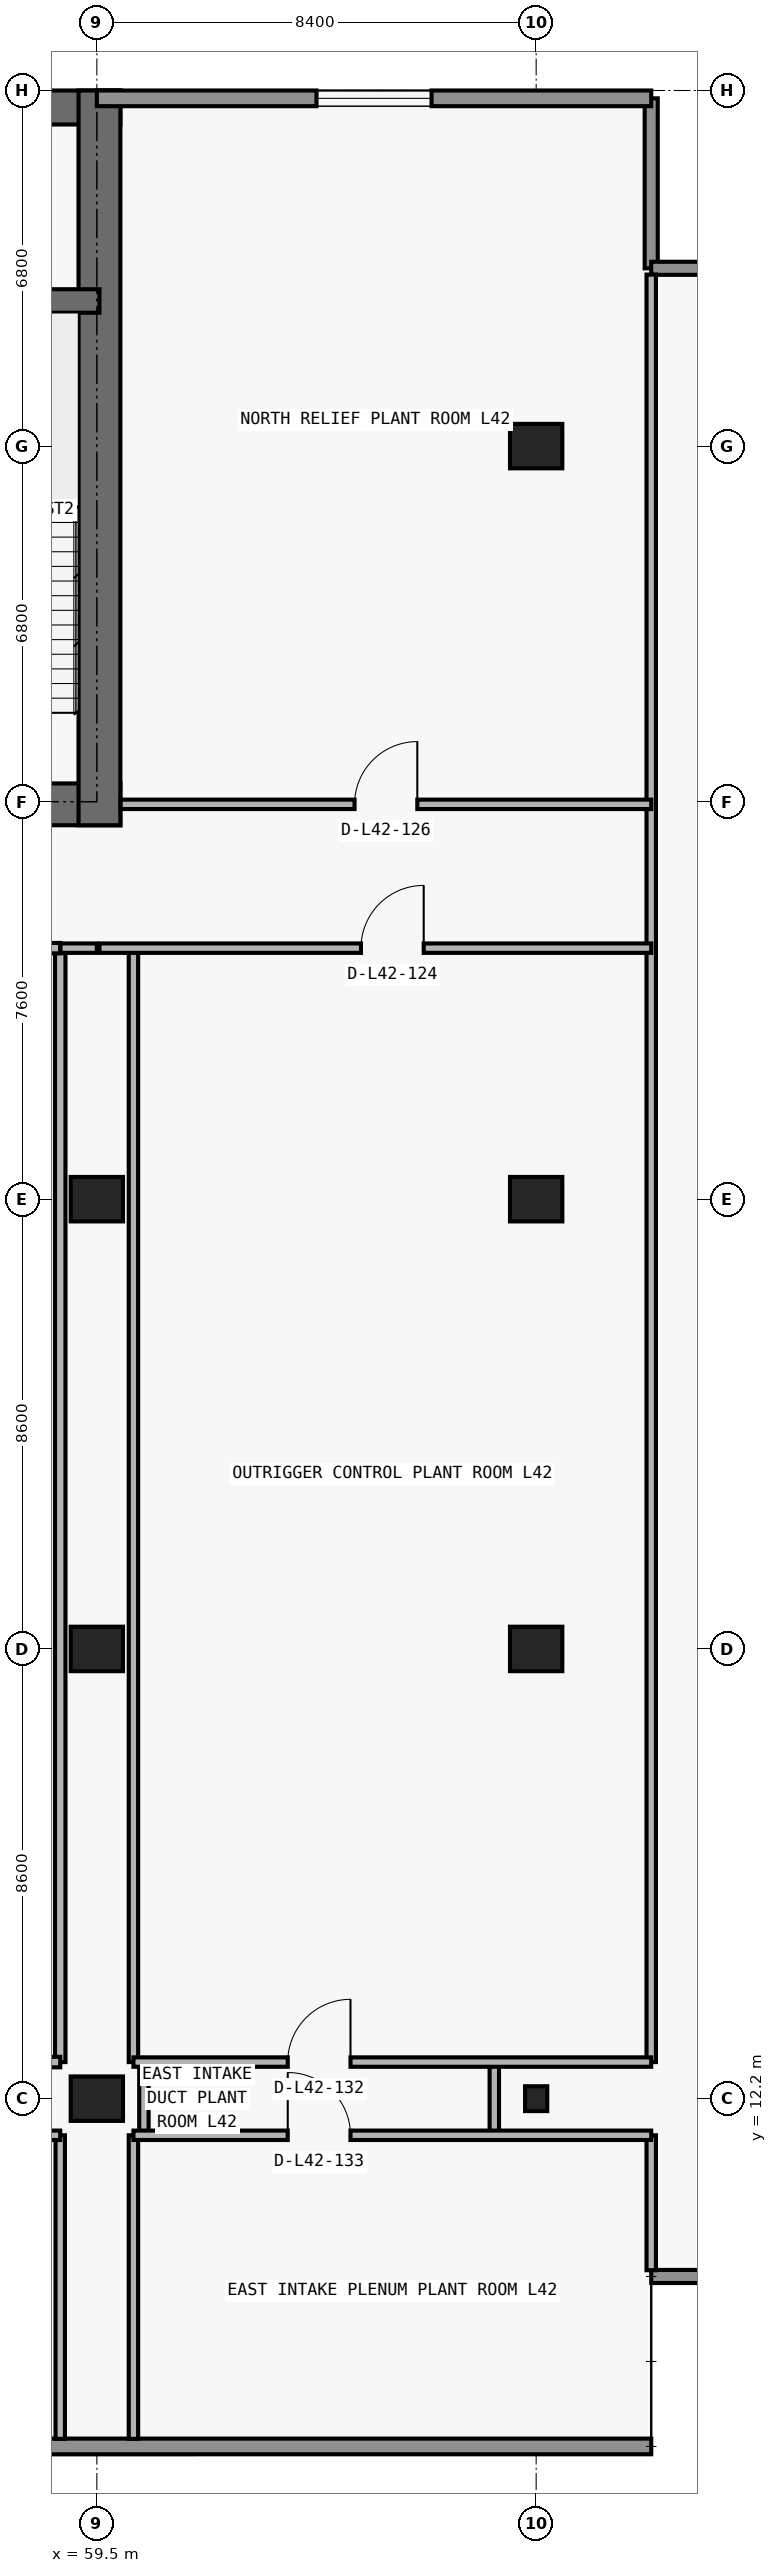
"""IFC4 building model, lengths in metres.
Left out: names, types, materials, properties, quantities, classifications, styles, units other than length and angle.
Written with IfcOpenShell. Run it as: python <this file> out.ifc"""

import sys

from ifc_helpers import new_model, si_unit, direction, frame, frame_2d, origin, origin_2d, place, context, subcontext, project, spatial, rectangle, i_section, extrude, element, fill, save


model = new_model("IFC4")
c1 = context("Model", 3, precision=1e-05, world=origin(), true_north=direction((0.0, 1.0)))
c2 = subcontext(c1, "Body", "Model", "MODEL_VIEW")
j1 = project(units=[si_unit("LENGTHUNIT", "METRE"), si_unit("PLANEANGLEUNIT", "RADIAN")], contexts=[c1])
p1 = place(None, origin())
s1 = spatial("IfcSite", under=j1, at=p1, CompositionType="ELEMENT")
p2 = place(p1, origin())
s2 = spatial("IfcBuilding", under=s1, at=p2, CompositionType="ELEMENT")
p3 = place(p2, frame((0.0, 0.0, 152.1)))
s3 = spatial("IfcBuildingStorey", under=s2, at=p3, CompositionType="ELEMENT", Elevation=152.1)
p4 = place(p3, frame((59.5, 12.2, 0.0), z_axis=(0.0, 0.0, 1.0), x_axis=(1.0, 0.0, 0.0)))
e1 = element("IfcColumn", 1, at=p4, inside=s3, PredefinedType="COLUMN", context=c2, shape_type="SweptSolid", body=[
    extrude(rectangle(XDim=1.0, YDim=0.85, at=origin_2d()), origin(), (0.0, 0.0, 1.0), 4.85),
])
p5 = place(p3, frame((67.9, 12.2, 0.0), z_axis=(0.0, 0.0, 1.0), x_axis=(1.0, 0.0, 0.0)))
e2 = element("IfcColumn", 2, at=p5, inside=s3, PredefinedType="COLUMN", context=c2, shape_type="SweptSolid", body=[
    extrude(i_section(OverallWidth=0.424, OverallDepth=0.475, WebThickness=0.048, FlangeThickness=0.077, FilletRadius=0.015, at=origin_2d()), origin(), (0.0, 0.0, 1.0), 4.85),
])
for number, where, z_axis, x_axis in (
    (3, (59.5, 20.8, 0.0), (0.0, 0.0, 1.0), (1.0, 0.0, 0.0)),
    (4, (67.9, 20.8, 0.0), (0.0, 0.0, 1.0), (1.0, 0.0, 0.0)),
    (5, (59.5, 29.4, 0.0), (0.0, 0.0, 1.0), (1.0, 0.0, 0.0)),
    (6, (67.9, 29.4, 0.0), (0.0, 0.0, 1.0), (1.0, 0.0, 0.0)),
    (7, (67.9, 43.8, 0.0), (0.0, 0.0, 1.0), (1.0, 0.0, 0.0)),
):
    element("IfcColumn", number, at=place(p3, frame(where, z_axis=z_axis, x_axis=x_axis)), inside=s3, PredefinedType="COLUMN", context=c2, shape_type="SweptSolid", body=[
        extrude(rectangle(XDim=1.0, YDim=0.85, at=origin_2d()), origin(), (0.0, 0.0, 1.0), 4.85),
    ])
p6 = place(p3, frame((17.85, 36.95, 0.0), z_axis=(0.0, 0.0, 1.0), x_axis=(1.0, 0.0, 0.0)))
e8 = element("IfcWall", 8, at=p6, inside=s3, PredefinedType="SHEAR", context=c2, shape_type="SweptSolid", body=[
    extrude(rectangle(XDim=42.1, YDim=0.8, at=frame_2d((21.05, 0.0))), origin(), (0.0, 0.0, 1.0), 4.85),
])
p7 = place(p6, frame((14.45, 0.0, 0.0)))
e9 = element("IfcOpeningElement", 9, at=p7, cuts=e8, PredefinedType="OPENING", context=c2, shape_type="SweptSolid", body=[
    extrude(rectangle(XDim=1.1, YDim=2.15, at=frame_2d((0.55, 1.075))), frame((0.0, 0.41, 0.0), z_axis=(0.0, -1.0, 0.0), x_axis=(1.0, 0.0, 0.0)), (0.0, 0.0, 1.0), 0.82),
])
p8 = place(p6, frame((6.3, 0.0, 0.0)))
e10 = element("IfcOpeningElement", 10, at=p8, cuts=e8, PredefinedType="OPENING", context=c2, shape_type="SweptSolid", body=[
    extrude(rectangle(XDim=1.05, YDim=2.15, at=frame_2d((0.525, 1.075))), frame((0.0, 0.41, 0.0), z_axis=(0.0, -1.0, 0.0), x_axis=(1.0, 0.0, 0.0)), (0.0, 0.0, 1.0), 0.82),
])
p9 = place(p6, frame((34.8, 0.0, 0.0)))
e11 = element("IfcOpeningElement", 11, at=p9, cuts=e8, PredefinedType="OPENING", context=c2, shape_type="SweptSolid", body=[
    extrude(rectangle(XDim=1.05, YDim=2.15, at=frame_2d((0.525, 1.075))), frame((0.0, 0.41, 0.0), z_axis=(0.0, -1.0, 0.0), x_axis=(1.0, 0.0, 0.0)), (0.0, 0.0, 1.0), 0.82),
])
p10 = place(p6, frame((10.913, 0.0, 0.0)))
e12 = element("IfcOpeningElement", 12, at=p10, cuts=e8, PredefinedType="OPENING", context=c2, shape_type="SweptSolid", body=[
    extrude(rectangle(XDim=1.05, YDim=2.15, at=frame_2d((0.525, 1.075))), frame((0.0, 0.41, 0.0), z_axis=(0.0, -1.0, 0.0), x_axis=(1.0, 0.0, 0.0)), (0.0, 0.0, 1.0), 0.82),
])
p11 = place(p6, frame((24.15, 0.0, 0.0)))
e13 = element("IfcOpeningElement", 13, at=p11, cuts=e8, PredefinedType="OPENING", context=c2, shape_type="SweptSolid", body=[
    extrude(rectangle(XDim=1.05, YDim=2.15, at=frame_2d((0.525, 1.075))), frame((0.0, 0.41, 0.0), z_axis=(0.0, -1.0, 0.0), x_axis=(1.0, 0.0, 0.0)), (0.0, 0.0, 1.0), 0.82),
])
p12 = place(p3, frame((17.85, 50.275, 0.0), z_axis=(0.0, 0.0, 1.0), x_axis=(1.0, 0.0, 0.0)))
e14 = element("IfcWall", 14, at=p12, inside=s3, PredefinedType="SHEAR", context=c2, shape_type="SweptSolid", body=[
    extrude(rectangle(XDim=42.1, YDim=0.65, at=frame_2d((21.05, 0.0))), origin(), (0.0, 0.0, 1.0), 4.85),
])
p13 = place(p3, frame((59.55, 36.55, 0.0), z_axis=(0.0, 0.0, 1.0), x_axis=(0.0, 1.0, 0.0)))
e15 = element("IfcWall", 15, at=p13, inside=s3, PredefinedType="SHEAR", context=c2, shape_type="SweptSolid", body=[
    extrude(rectangle(XDim=14.05, YDim=0.8, at=frame_2d((7.025, 0.0))), origin(), (0.0, 0.0, 1.0), 4.85),
])
p14 = place(p3, frame((18.25, 46.575, 0.0), z_axis=(0.0, 0.0, 1.0), x_axis=(1.0, 0.0, 0.0)))
e16 = element("IfcWall", 16, at=p14, inside=s3, PredefinedType="SHEAR", context=c2, shape_type="SweptSolid", body=[
    extrude(rectangle(XDim=41.3, YDim=0.45, at=frame_2d((20.65, 0.0))), origin(), (0.0, 0.0, 1.0), 4.85),
])
p15 = place(p14, frame((7.625, 0.0, 0.0)))
e17 = element("IfcOpeningElement", 17, at=p15, cuts=e16, PredefinedType="OPENING", context=c2, shape_type="SweptSolid", body=[
    extrude(rectangle(XDim=1.05, YDim=2.15, at=frame_2d((0.525, 1.075))), frame((0.0, 0.235, 0.0), z_axis=(0.0, -1.0, 0.0), x_axis=(1.0, 0.0, 0.0)), (0.0, 0.0, 1.0), 0.47),
])
p16 = place(p14, frame((32.675, 0.0, 0.0)))
e18 = element("IfcOpeningElement", 18, at=p16, cuts=e16, PredefinedType="OPENING", context=c2, shape_type="SweptSolid", body=[
    extrude(rectangle(XDim=1.05, YDim=2.15, at=frame_2d((0.525, 1.075))), frame((0.0, 0.235, 0.0), z_axis=(0.0, -1.0, 0.0), x_axis=(1.0, 0.0, 0.0)), (0.0, 0.0, 1.0), 0.47),
])
p17 = place(p3, frame((70.1, 5.55, 0.0), z_axis=(0.0, 0.0, 1.0), x_axis=(-1.0, 0.0, 0.0)))
e19 = element("IfcWall", 19, at=p17, inside=s3, PredefinedType="STANDARD", context=c2, shape_type="SweptSolid", body=[
    extrude(rectangle(XDim=62.4, YDim=0.3, at=frame_2d((31.2, 0.0))), origin(), (0.0, 0.0, 1.0), 4.85),
])
p18 = place(p3, frame((70.1, 8.8, 0.0), z_axis=(0.0, 0.0, 1.0), x_axis=(1.0, 0.0, 0.0)))
e20 = element("IfcWall", 20, at=p18, inside=s3, PredefinedType="ELEMENTEDWALL", context=c2, shape_type="SweptSolid", body=[
    extrude(rectangle(XDim=3.65, YDim=0.25, at=frame_2d((1.825, 0.0))), origin(), (0.0, 0.0, 1.0), 4.85),
])
p19 = place(p3, frame((70.1, 50.45, 0.0), z_axis=(0.0, 0.0, 1.0), x_axis=(0.0, -1.0, 0.0)))
e21 = element("IfcWall", 21, at=p19, inside=s3, PredefinedType="ELEMENTEDWALL", context=c2, shape_type="SweptSolid", body=[
    extrude(rectangle(XDim=3.25, YDim=0.25, at=frame_2d((1.625, 0.0))), origin(), (0.0, 0.0, 1.0), 4.85),
])
p20 = place(p3, frame((70.1, 47.2, 0.0), z_axis=(0.0, 0.0, 1.0), x_axis=(1.0, 0.0, 0.0)))
e22 = element("IfcWall", 22, at=p20, inside=s3, PredefinedType="ELEMENTEDWALL", context=c2, shape_type="SweptSolid", body=[
    extrude(rectangle(XDim=3.65, YDim=0.25, at=frame_2d((1.825, 0.0))), origin(), (0.0, 0.0, 1.0), 4.85),
])
p21 = place(p3, frame((59.5, 50.45, 0.0), z_axis=(0.0, 0.0, 1.0), x_axis=(1.0, 0.0, 0.0)))
e23 = element("IfcWall", 23, at=p21, inside=s3, PredefinedType="STANDARD", context=c2, shape_type="SweptSolid", body=[
    extrude(rectangle(XDim=10.6, YDim=0.3, at=frame_2d((5.3, 0.0))), origin(), (0.0, 0.0, 1.0), 4.85),
])
p22 = place(p21, frame((4.2, 0.0, 0.85)))
e24 = element("IfcOpeningElement", 24, at=p22, cuts=e23, PredefinedType="OPENING", context=c2, shape_type="SweptSolid", body=[
    extrude(rectangle(XDim=2.2, YDim=1.55, at=frame_2d((1.1, 0.775))), frame((0.0, 0.16, 0.0), z_axis=(0.0, -1.0, 0.0), x_axis=(1.0, 0.0, 0.0)), (0.0, 0.0, 1.0), 0.32),
])
p23 = place(p3, frame((58.8, 5.695, 0.0), z_axis=(0.0, 0.0, 1.0), x_axis=(0.0, 1.0, 0.0)))
e25 = element("IfcWall", 25, at=p23, inside=s3, PredefinedType="PARTITIONING", context=c2, shape_type="SweptSolid", body=[
    extrude(rectangle(XDim=5.805, YDim=0.18, at=frame_2d((2.902, 0.0))), origin(), (0.0, 0.0, 1.0), 4.85),
])
p24 = place(p3, frame((58.8, 12.9, 0.0), z_axis=(0.0, 0.0, 1.0), x_axis=(0.0, 1.0, 0.0)))
e26 = element("IfcWall", 26, at=p24, inside=s3, PredefinedType="PARTITIONING", context=c2, shape_type="SweptSolid", body=[
    extrude(rectangle(XDim=21.3, YDim=0.2, at=frame_2d((10.65, 0.0))), origin(), (0.0, 0.0, 1.0), 4.85),
])
p25 = place(p3, frame((60.2, 5.695, 0.0), z_axis=(0.0, 0.0, 1.0), x_axis=(0.0, 1.0, 0.0)))
e27 = element("IfcWall", 27, at=p25, inside=s3, PredefinedType="PARTITIONING", context=c2, shape_type="SweptSolid", body=[
    extrude(rectangle(XDim=5.805, YDim=0.18, at=frame_2d((2.902, 0.0))), origin(), (0.0, 0.0, 1.0), 4.85),
])
p26 = place(p3, frame((60.2, 12.9, 0.0), z_axis=(0.0, 0.0, 1.0), x_axis=(0.0, 1.0, 0.0)))
e28 = element("IfcWall", 28, at=p26, inside=s3, PredefinedType="PARTITIONING", context=c2, shape_type="SweptSolid", body=[
    extrude(rectangle(XDim=21.3, YDim=0.18, at=frame_2d((10.65, 0.0))), origin(), (0.0, 0.0, 1.0), 4.85),
])
p27 = place(p3, frame((60.4, 11.505, 0.0), z_axis=(0.0, 0.0, 1.0), x_axis=(0.0, 1.0, 0.0)))
e29 = element("IfcWall", 29, at=p27, inside=s3, PredefinedType="PARTITIONING", context=c2, shape_type="SweptSolid", body=[
    extrude(rectangle(XDim=1.39, YDim=0.18, at=frame_2d((0.695, 0.0))), origin(), (0.0, 0.0, 1.0), 4.85),
])
p28 = place(p3, frame((67.1, 11.5, 0.0), z_axis=(0.0, 0.0, 1.0), x_axis=(0.0, 1.0, 0.0)))
e30 = element("IfcWall", 30, at=p28, inside=s3, PredefinedType="PARTITIONING", context=c2, shape_type="SweptSolid", body=[
    extrude(rectangle(XDim=1.4, YDim=0.18, at=frame_2d((0.7, 0.0))), origin(), (0.0, 0.0, 1.0), 4.85),
])
p29 = place(p3, frame((70.1, 8.92, 0.0), z_axis=(0.0, 0.0, 1.0), x_axis=(0.0, 1.0, 0.0)))
e31 = element("IfcWall", 31, at=p29, inside=s3, PredefinedType="PARTITIONING", context=c2, shape_type="SweptSolid", body=[
    extrude(rectangle(XDim=2.58, YDim=0.18, at=frame_2d((1.29, 0.0))), origin(), (0.0, 0.0, 1.0), 4.85),
])
p30 = place(p3, frame((70.1, 12.9, 0.0), z_axis=(0.0, 0.0, 1.0), x_axis=(0.0, 1.0, 0.0)))
e32 = element("IfcWall", 32, at=p30, inside=s3, PredefinedType="PARTITIONING", context=c2, shape_type="SweptSolid", body=[
    extrude(rectangle(XDim=34.18, YDim=0.18, at=frame_2d((17.09, 0.0))), origin(), (0.0, 0.0, 1.0), 4.85),
])
p31 = place(p3, frame((19.0, 11.5, 0.0), z_axis=(0.0, 0.0, 1.0), x_axis=(1.0, 0.0, 0.0)))
e33 = element("IfcWall", 33, at=p31, inside=s3, PredefinedType="PARTITIONING", context=c2, shape_type="SweptSolid", body=[
    extrude(rectangle(XDim=39.8, YDim=0.18, at=frame_2d((19.9, 0.0))), origin(), (0.0, 0.0, 1.0), 4.85),
])
p32 = place(p31, frame((19.3, 0.0, 0.0)))
e34 = element("IfcOpeningElement", 34, at=p32, cuts=e33, PredefinedType="OPENING", context=c2, shape_type="SweptSolid", body=[
    extrude(rectangle(XDim=1.2, YDim=2.2, at=frame_2d((0.6, 1.1))), frame((0.0, 0.1, 0.0), z_axis=(0.0, -1.0, 0.0), x_axis=(1.0, 0.0, 0.0)), (0.0, 0.0, 1.0), 0.2),
])
p33 = place(p3, frame((60.2, 11.5, 0.0), z_axis=(0.0, 0.0, 1.0), x_axis=(1.0, 0.0, 0.0)))
e35 = element("IfcWall", 35, at=p33, inside=s3, PredefinedType="PARTITIONING", context=c2, shape_type="SweptSolid", body=[
    extrude(rectangle(XDim=9.9, YDim=0.18, at=frame_2d((4.95, 0.0))), origin(), (0.0, 0.0, 1.0), 4.85),
])
p34 = place(p33, frame((2.95, 0.0, 0.0)))
e36 = element("IfcOpeningElement", 36, at=p34, cuts=e35, PredefinedType="OPENING", context=c2, shape_type="SweptSolid", body=[
    extrude(rectangle(XDim=1.2, YDim=2.2, at=frame_2d((0.6, 1.1))), frame((0.0, 0.1, 0.0), z_axis=(0.0, -1.0, 0.0), x_axis=(1.0, 0.0, 0.0)), (0.0, 0.0, 1.0), 0.2),
])
p35 = place(p3, frame((42.705, 12.9, 0.0), z_axis=(0.0, 0.0, 1.0), x_axis=(1.0, 0.0, 0.0)))
e37 = element("IfcWall", 37, at=p35, inside=s3, PredefinedType="PARTITIONING", context=c2, shape_type="SweptSolid", body=[
    extrude(rectangle(XDim=16.095, YDim=0.2, at=frame_2d((8.047, 0.0))), origin(), (0.0, 0.0, 1.0), 4.85),
])
p36 = place(p3, frame((60.2, 12.9, 0.0), z_axis=(0.0, 0.0, 1.0), x_axis=(1.0, 0.0, 0.0)))
e38 = element("IfcWall", 38, at=p36, inside=s3, PredefinedType="PARTITIONING", context=c2, shape_type="SweptSolid", body=[
    extrude(rectangle(XDim=9.9, YDim=0.18, at=frame_2d((4.95, 0.0))), origin(), (0.0, 0.0, 1.0), 4.85),
])
p37 = place(p36, frame((2.95, 0.0, 0.0)))
e39 = element("IfcOpeningElement", 39, at=p37, cuts=e38, PredefinedType="OPENING", context=c2, shape_type="SweptSolid", body=[
    extrude(rectangle(XDim=1.2, YDim=2.2, at=frame_2d((0.6, 1.1))), frame((0.0, 0.1, 0.0), z_axis=(0.0, -1.0, 0.0), x_axis=(1.0, 0.0, 0.0)), (0.0, 0.0, 1.0), 0.2),
])
p38 = place(p3, frame((42.705, 34.2, 0.0), z_axis=(0.0, 0.0, 1.0), x_axis=(1.0, 0.0, 0.0)))
e40 = element("IfcWall", 40, at=p38, inside=s3, PredefinedType="PARTITIONING", context=c2, shape_type="SweptSolid", body=[
    extrude(rectangle(XDim=16.095, YDim=0.2, at=frame_2d((8.047, 0.0))), origin(), (0.0, 0.0, 1.0), 4.85),
])
p39 = place(p38, frame((7.522, 0.0, 0.0)))
e41 = element("IfcOpeningElement", 41, at=p39, cuts=e40, PredefinedType="OPENING", context=c2, shape_type="SweptSolid", body=[
    extrude(rectangle(XDim=1.05, YDim=2.15, at=frame_2d((0.525, 1.075))), frame((0.0, 0.11, 0.0), z_axis=(0.0, -1.0, 0.0), x_axis=(1.0, 0.0, 0.0)), (0.0, 0.0, 1.0), 0.22),
])
p40 = place(p3, frame((58.805, 34.2, 0.0), z_axis=(0.0, 0.0, 1.0), x_axis=(1.0, 0.0, 0.0)))
e42 = element("IfcWall", 42, at=p40, inside=s3, PredefinedType="PARTITIONING", context=c2, shape_type="SweptSolid", body=[
    extrude(rectangle(XDim=0.695, YDim=0.18, at=frame_2d((0.348, 0.0))), origin(), (0.0, 0.0, 1.0), 4.85),
])
p41 = place(p3, frame((59.55, 34.2, 0.0), z_axis=(0.0, 0.0, 1.0), x_axis=(1.0, 0.0, 0.0)))
e43 = element("IfcWall", 43, at=p41, inside=s3, PredefinedType="PARTITIONING", context=c2, shape_type="SweptSolid", body=[
    extrude(rectangle(XDim=10.55, YDim=0.18, at=frame_2d((5.275, 0.0))), origin(), (0.0, 0.0, 1.0), 4.85),
])
p42 = place(p41, frame((5.0, 0.0, 0.0)))
e44 = element("IfcOpeningElement", 44, at=p42, cuts=e43, PredefinedType="OPENING", context=c2, shape_type="SweptSolid", body=[
    extrude(rectangle(XDim=1.2, YDim=2.2, at=frame_2d((0.6, 1.1))), frame((0.0, 0.1, 0.0), z_axis=(0.0, -1.0, 0.0), x_axis=(1.0, 0.0, 0.0)), (0.0, 0.0, 1.0), 0.2),
])
p43 = place(p3, frame((59.955, 36.95, 0.0), z_axis=(0.0, 0.0, 1.0), x_axis=(1.0, 0.0, 0.0)))
e45 = element("IfcWall", 45, at=p43, inside=s3, PredefinedType="PARTITIONING", context=c2, shape_type="SweptSolid", body=[
    extrude(rectangle(XDim=10.145, YDim=0.18, at=frame_2d((5.073, 0.0))), origin(), (0.0, 0.0, 1.0), 4.85),
])
p44 = place(p43, frame((4.472, 0.0, 0.0)))
e46 = element("IfcOpeningElement", 46, at=p44, cuts=e45, PredefinedType="OPENING", context=c2, shape_type="SweptSolid", body=[
    extrude(rectangle(XDim=1.2, YDim=2.2, at=frame_2d((0.6, 1.1))), frame((0.0, 0.1, 0.0), z_axis=(0.0, -1.0, 0.0), x_axis=(1.0, 0.0, 0.0)), (0.0, 0.0, 1.0), 0.2),
])
p45 = place(p22, origin())
e47 = element("IfcWindow", 47, at=p45, inside=s3, PartitioningType="SINGLE_PANEL", PredefinedType="WINDOW", context=c2, shape_type="SweptSolid", body=[
    extrude(rectangle(XDim=2.2, YDim=1.55, at=frame_2d((1.1, 0.775))), frame((0.0, 0.03, 0.0), z_axis=(0.0, -1.0, 0.0), x_axis=(1.0, 0.0, 0.0)), (0.0, 0.0, 1.0), 0.06),
])
fill(e24, e47)
p46 = place(p42, origin())
e48 = element("IfcDoor", 48, at=p46, inside=s3, OperationType="SINGLE_SWING_RIGHT", PredefinedType="DOOR", context=c2, shape_type="SweptSolid", body=[
    extrude(rectangle(XDim=1.2, YDim=2.2, at=frame_2d((0.6, 1.1))), frame((0.0, 0.025, 0.0), z_axis=(0.0, -1.0, 0.0), x_axis=(1.0, 0.0, 0.0)), (0.0, 0.0, 1.0), 0.05),
])
fill(e44, e48)
p47 = place(p44, origin())
e49 = element("IfcDoor", 49, at=p47, inside=s3, OperationType="SINGLE_SWING_RIGHT", PredefinedType="DOOR", context=c2, shape_type="SweptSolid", body=[
    extrude(rectangle(XDim=1.2, YDim=2.2, at=frame_2d((0.6, 1.1))), frame((0.0, 0.025, 0.0), z_axis=(0.0, -1.0, 0.0), x_axis=(1.0, 0.0, 0.0)), (0.0, 0.0, 1.0), 0.05),
])
fill(e46, e49)
p48 = place(p37, origin())
e50 = element("IfcDoor", 50, at=p48, inside=s3, OperationType="SINGLE_SWING_RIGHT", PredefinedType="DOOR", context=c2, shape_type="SweptSolid", body=[
    extrude(rectangle(XDim=1.2, YDim=2.2, at=frame_2d((0.6, 1.1))), frame((0.0, 0.025, 0.0), z_axis=(0.0, -1.0, 0.0), x_axis=(1.0, 0.0, 0.0)), (0.0, 0.0, 1.0), 0.05),
])
fill(e39, e50)
p49 = place(p34, origin())
e51 = element("IfcDoor", 51, at=p49, inside=s3, OperationType="SINGLE_SWING_LEFT", PredefinedType="DOOR", context=c2, shape_type="SweptSolid", body=[
    extrude(rectangle(XDim=1.2, YDim=2.2, at=frame_2d((0.6, 1.1))), frame((0.0, 0.025, 0.0), z_axis=(0.0, -1.0, 0.0), x_axis=(1.0, 0.0, 0.0)), (0.0, 0.0, 1.0), 0.05),
])
fill(e36, e51)
save(model, sys.argv[1])
